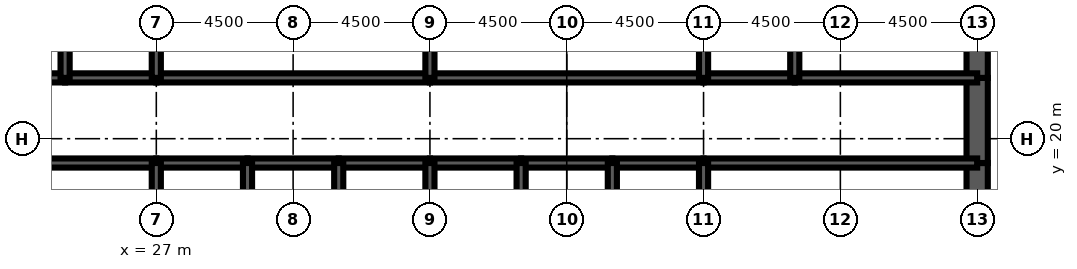
"""IFC4 building model, lengths in metres.
Left out: names, types, materials, properties, quantities, classifications, styles, units other than length and angle.
Written with IfcOpenShell. Run it as: python <this file> out.ifc"""

import sys

from ifc_helpers import new_model, si_unit, direction, frame, frame_2d, origin, place, context, subcontext, project, spatial, rectangle, extrude, element, fill, save


model = new_model("IFC4")
c1 = context("Model", 3, precision=1e-05, world=origin(), true_north=direction((0.0, 1.0)))
c2 = subcontext(c1, "Body", "Model", "MODEL_VIEW")
j1 = project(units=[si_unit("LENGTHUNIT", "METRE"), si_unit("PLANEANGLEUNIT", "RADIAN")], contexts=[c1])
p1 = place(None, origin())
s1 = spatial("IfcSite", under=j1, at=p1, CompositionType="ELEMENT")
p2 = place(p1, origin())
s2 = spatial("IfcBuilding", under=s1, at=p2, CompositionType="ELEMENT")
p3 = place(p2, frame((0.0, 0.0, 304.7)))
s3 = spatial("IfcBuildingStorey", under=s2, at=p3, CompositionType="ELEMENT", Elevation=304.7)
p4 = place(p3, frame((54.0, 16.0, 0.0), z_axis=(0.0, 0.0, 1.0), x_axis=(0.0, 1.0, 0.0)))
e1 = element("IfcWall", 1, at=p4, inside=s3, PredefinedType="SHEAR", context=c2, shape_type="SweptSolid", body=[
    extrude(rectangle(XDim=3.2, YDim=0.7, at=frame_2d((1.6, 0.0))), origin(), (0.0, 0.0, 1.0), 4.2),
])
p5 = place(p3, frame((54.0, 19.2, 0.0), z_axis=(0.0, 0.0, 1.0), x_axis=(0.0, 1.0, 0.0)))
e2 = element("IfcWall", 2, at=p5, inside=s3, PredefinedType="SHEAR", context=c2, shape_type="SweptSolid", body=[
    extrude(rectangle(XDim=2.8, YDim=0.7, at=frame_2d((1.4, 0.0))), origin(), (0.0, 0.0, 1.0), 4.2),
])
p6 = place(p5, frame((0.4, 0.0, 0.0)))
e3 = element("IfcOpeningElement", 3, at=p6, cuts=e2, PredefinedType="OPENING", context=c2, shape_type="SweptSolid", body=[
    extrude(rectangle(XDim=1.8, YDim=2.1, at=frame_2d((0.9, 1.05))), frame((0.0, 0.36, 0.0), z_axis=(0.0, -1.0, 0.0), x_axis=(1.0, 0.0, 0.0)), (0.0, 0.0, 1.0), 0.72),
])
p7 = place(p3, frame((54.0, 22.0, 0.0), z_axis=(0.0, 0.0, 1.0), x_axis=(0.0, 1.0, 0.0)))
e4 = element("IfcWall", 4, at=p7, inside=s3, PredefinedType="SHEAR", context=c2, shape_type="SweptSolid", body=[
    extrude(rectangle(XDim=4.0, YDim=0.7, at=frame_2d((2.0, 0.0))), origin(), (0.0, 0.0, 1.0), 4.2),
])
p8 = place(p3, frame((18.0, 19.2, 0.0), z_axis=(0.0, 0.0, 1.0), x_axis=(1.0, 0.0, 0.0)))
e5 = element("IfcWall", 5, at=p8, inside=s3, PredefinedType="SOLIDWALL", context=c2, shape_type="SweptSolid", body=[
    extrude(rectangle(XDim=9.0, YDim=0.3, at=frame_2d((4.5, 0.0))), origin(), (0.0, 0.0, 1.0), 4.2),
])
p9 = place(p8, frame((0.65, 0.0, 0.0)))
e6 = element("IfcOpeningElement", 6, at=p9, cuts=e5, PredefinedType="OPENING", context=c2, shape_type="SweptSolid", body=[
    extrude(rectangle(XDim=1.0, YDim=2.1, at=frame_2d((0.5, 1.05))), frame((0.0, 0.16, 0.0), z_axis=(0.0, -1.0, 0.0), x_axis=(1.0, 0.0, 0.0)), (0.0, 0.0, 1.0), 0.32),
])
p10 = place(p3, frame((27.0, 19.2, 0.0), z_axis=(0.0, 0.0, 1.0), x_axis=(1.0, 0.0, 0.0)))
e7 = element("IfcWall", 7, at=p10, inside=s3, PredefinedType="SOLIDWALL", context=c2, shape_type="SweptSolid", body=[
    extrude(rectangle(XDim=3.0, YDim=0.3, at=frame_2d((1.5, 0.0))), origin(), (0.0, 0.0, 1.0), 4.2),
])
p11 = place(p10, frame((0.95, 0.0, 0.0)))
e8 = element("IfcOpeningElement", 8, at=p11, cuts=e7, PredefinedType="OPENING", context=c2, shape_type="SweptSolid", body=[
    extrude(rectangle(XDim=1.1, YDim=2.2, at=frame_2d((0.55, 1.1))), frame((0.0, 0.16, 0.0), z_axis=(0.0, -1.0, 0.0), x_axis=(1.0, 0.0, 0.0)), (0.0, 0.0, 1.0), 0.32),
])
p12 = place(p3, frame((30.0, 19.2, 0.0), z_axis=(0.0, 0.0, 1.0), x_axis=(1.0, 0.0, 0.0)))
e9 = element("IfcWall", 9, at=p12, inside=s3, PredefinedType="SOLIDWALL", context=c2, shape_type="SweptSolid", body=[
    extrude(rectangle(XDim=3.0, YDim=0.3, at=frame_2d((1.5, 0.0))), origin(), (0.0, 0.0, 1.0), 4.2),
])
p13 = place(p12, frame((0.95, 0.0, 0.0)))
e10 = element("IfcOpeningElement", 10, at=p13, cuts=e9, PredefinedType="OPENING", context=c2, shape_type="SweptSolid", body=[
    extrude(rectangle(XDim=1.1, YDim=2.2, at=frame_2d((0.55, 1.1))), frame((0.0, 0.16, 0.0), z_axis=(0.0, -1.0, 0.0), x_axis=(1.0, 0.0, 0.0)), (0.0, 0.0, 1.0), 0.32),
])
p14 = place(p3, frame((33.0, 19.2, 0.0), z_axis=(0.0, 0.0, 1.0), x_axis=(1.0, 0.0, 0.0)))
e11 = element("IfcWall", 11, at=p14, inside=s3, PredefinedType="SOLIDWALL", context=c2, shape_type="SweptSolid", body=[
    extrude(rectangle(XDim=3.0, YDim=0.3, at=frame_2d((1.5, 0.0))), origin(), (0.0, 0.0, 1.0), 4.2),
])
p15 = place(p14, frame((0.95, 0.0, 0.0)))
e12 = element("IfcOpeningElement", 12, at=p15, cuts=e11, PredefinedType="OPENING", context=c2, shape_type="SweptSolid", body=[
    extrude(rectangle(XDim=1.1, YDim=2.2, at=frame_2d((0.55, 1.1))), frame((0.0, 0.16, 0.0), z_axis=(0.0, -1.0, 0.0), x_axis=(1.0, 0.0, 0.0)), (0.0, 0.0, 1.0), 0.32),
])
p16 = place(p3, frame((36.0, 19.2, 0.0), z_axis=(0.0, 0.0, 1.0), x_axis=(1.0, 0.0, 0.0)))
e13 = element("IfcWall", 13, at=p16, inside=s3, PredefinedType="SOLIDWALL", context=c2, shape_type="SweptSolid", body=[
    extrude(rectangle(XDim=3.0, YDim=0.3, at=frame_2d((1.5, 0.0))), origin(), (0.0, 0.0, 1.0), 4.2),
])
p17 = place(p16, frame((0.95, 0.0, 0.0)))
e14 = element("IfcOpeningElement", 14, at=p17, cuts=e13, PredefinedType="OPENING", context=c2, shape_type="SweptSolid", body=[
    extrude(rectangle(XDim=1.1, YDim=2.2, at=frame_2d((0.55, 1.1))), frame((0.0, 0.16, 0.0), z_axis=(0.0, -1.0, 0.0), x_axis=(1.0, 0.0, 0.0)), (0.0, 0.0, 1.0), 0.32),
])
p18 = place(p3, frame((39.0, 19.2, 0.0), z_axis=(0.0, 0.0, 1.0), x_axis=(1.0, 0.0, 0.0)))
e15 = element("IfcWall", 15, at=p18, inside=s3, PredefinedType="SOLIDWALL", context=c2, shape_type="SweptSolid", body=[
    extrude(rectangle(XDim=3.0, YDim=0.3, at=frame_2d((1.5, 0.0))), origin(), (0.0, 0.0, 1.0), 4.2),
])
p19 = place(p18, frame((1.0, 0.0, 0.0)))
e16 = element("IfcOpeningElement", 16, at=p19, cuts=e15, PredefinedType="OPENING", context=c2, shape_type="SweptSolid", body=[
    extrude(rectangle(XDim=1.0, YDim=2.1, at=frame_2d((0.5, 1.05))), frame((0.0, 0.16, 0.0), z_axis=(0.0, -1.0, 0.0), x_axis=(1.0, 0.0, 0.0)), (0.0, 0.0, 1.0), 0.32),
])
p20 = place(p3, frame((42.0, 19.2, 0.0), z_axis=(0.0, 0.0, 1.0), x_axis=(1.0, 0.0, 0.0)))
e17 = element("IfcWall", 17, at=p20, inside=s3, PredefinedType="SOLIDWALL", context=c2, shape_type="SweptSolid", body=[
    extrude(rectangle(XDim=3.0, YDim=0.3, at=frame_2d((1.5, 0.0))), origin(), (0.0, 0.0, 1.0), 4.2),
])
p21 = place(p20, frame((1.0, 0.0, 0.0)))
e18 = element("IfcOpeningElement", 18, at=p21, cuts=e17, PredefinedType="OPENING", context=c2, shape_type="SweptSolid", body=[
    extrude(rectangle(XDim=1.0, YDim=2.1, at=frame_2d((0.5, 1.05))), frame((0.0, 0.16, 0.0), z_axis=(0.0, -1.0, 0.0), x_axis=(1.0, 0.0, 0.0)), (0.0, 0.0, 1.0), 0.32),
])
p22 = place(p3, frame((45.0, 19.2, 0.0), z_axis=(0.0, 0.0, 1.0), x_axis=(1.0, 0.0, 0.0)))
e19 = element("IfcWall", 19, at=p22, inside=s3, PredefinedType="SOLIDWALL", context=c2, shape_type="SweptSolid", body=[
    extrude(rectangle(XDim=9.0, YDim=0.3, at=frame_2d((4.5, 0.0))), origin(), (0.0, 0.0, 1.0), 4.2),
])
p23 = place(p22, frame((7.35, 0.0, 0.0)))
e20 = element("IfcOpeningElement", 20, at=p23, cuts=e19, PredefinedType="OPENING", context=c2, shape_type="SweptSolid", body=[
    extrude(rectangle(XDim=1.0, YDim=2.1, at=frame_2d((0.5, 1.05))), frame((0.0, 0.16, 0.0), z_axis=(0.0, -1.0, 0.0), x_axis=(1.0, 0.0, 0.0)), (0.0, 0.0, 1.0), 0.32),
])
p24 = place(p3, frame((18.0, 22.0, 0.0), z_axis=(0.0, 0.0, 1.0), x_axis=(1.0, 0.0, 0.0)))
e21 = element("IfcWall", 21, at=p24, inside=s3, PredefinedType="SOLIDWALL", context=c2, shape_type="SweptSolid", body=[
    extrude(rectangle(XDim=6.0, YDim=0.3, at=frame_2d((3.0, 0.0))), origin(), (0.0, 0.0, 1.0), 4.2),
])
p25 = place(p24, frame((4.4, 0.0, 0.0)))
e22 = element("IfcOpeningElement", 22, at=p25, cuts=e21, PredefinedType="OPENING", context=c2, shape_type="SweptSolid", body=[
    extrude(rectangle(XDim=1.0, YDim=2.1, at=frame_2d((0.5, 1.05))), frame((0.0, 0.16, 0.0), z_axis=(0.0, -1.0, 0.0), x_axis=(1.0, 0.0, 0.0)), (0.0, 0.0, 1.0), 0.32),
])
p26 = place(p24, frame((0.9, 0.0, 0.0)))
e23 = element("IfcOpeningElement", 23, at=p26, cuts=e21, PredefinedType="OPENING", context=c2, shape_type="SweptSolid", body=[
    extrude(rectangle(XDim=1.0, YDim=2.1, at=frame_2d((0.5, 1.05))), frame((0.0, 0.16, 0.0), z_axis=(0.0, -1.0, 0.0), x_axis=(1.0, 0.0, 0.0)), (0.0, 0.0, 1.0), 0.32),
])
p27 = place(p3, frame((24.0, 22.0, 0.0), z_axis=(0.0, 0.0, 1.0), x_axis=(1.0, 0.0, 0.0)))
e24 = element("IfcWall", 24, at=p27, inside=s3, PredefinedType="SOLIDWALL", context=c2, shape_type="SweptSolid", body=[
    extrude(rectangle(XDim=3.0, YDim=0.3, at=frame_2d((1.5, 0.0))), origin(), (0.0, 0.0, 1.0), 4.2),
])
p28 = place(p27, frame((1.0, 0.0, 0.0)))
e25 = element("IfcOpeningElement", 25, at=p28, cuts=e24, PredefinedType="OPENING", context=c2, shape_type="SweptSolid", body=[
    extrude(rectangle(XDim=1.0, YDim=2.1, at=frame_2d((0.5, 1.05))), frame((0.0, 0.16, 0.0), z_axis=(0.0, -1.0, 0.0), x_axis=(1.0, 0.0, 0.0)), (0.0, 0.0, 1.0), 0.32),
])
p29 = place(p3, frame((27.0, 22.0, 0.0), z_axis=(0.0, 0.0, 1.0), x_axis=(1.0, 0.0, 0.0)))
e26 = element("IfcWall", 26, at=p29, inside=s3, PredefinedType="SOLIDWALL", context=c2, shape_type="SweptSolid", body=[
    extrude(rectangle(XDim=9.0, YDim=0.3, at=frame_2d((4.5, 0.0))), origin(), (0.0, 0.0, 1.0), 4.2),
])
p30 = place(p29, frame((4.0, 0.0, 0.0)))
e27 = element("IfcOpeningElement", 27, at=p30, cuts=e26, PredefinedType="OPENING", context=c2, shape_type="SweptSolid", body=[
    extrude(rectangle(XDim=1.0, YDim=2.1, at=frame_2d((0.5, 1.05))), frame((0.0, 0.16, 0.0), z_axis=(0.0, -1.0, 0.0), x_axis=(1.0, 0.0, 0.0)), (0.0, 0.0, 1.0), 0.32),
])
p31 = place(p3, frame((36.0, 22.0, 0.0), z_axis=(0.0, 0.0, 1.0), x_axis=(1.0, 0.0, 0.0)))
e28 = element("IfcWall", 28, at=p31, inside=s3, PredefinedType="SOLIDWALL", context=c2, shape_type="SweptSolid", body=[
    extrude(rectangle(XDim=9.0, YDim=0.3, at=frame_2d((4.5, 0.0))), origin(), (0.0, 0.0, 1.0), 4.2),
])
p32 = place(p31, frame((4.0, 0.0, 0.0)))
e29 = element("IfcOpeningElement", 29, at=p32, cuts=e28, PredefinedType="OPENING", context=c2, shape_type="SweptSolid", body=[
    extrude(rectangle(XDim=1.0, YDim=2.1, at=frame_2d((0.5, 1.05))), frame((0.0, 0.16, 0.0), z_axis=(0.0, -1.0, 0.0), x_axis=(1.0, 0.0, 0.0)), (0.0, 0.0, 1.0), 0.32),
])
p33 = place(p3, frame((45.0, 22.0, 0.0), z_axis=(0.0, 0.0, 1.0), x_axis=(1.0, 0.0, 0.0)))
e30 = element("IfcWall", 30, at=p33, inside=s3, PredefinedType="SOLIDWALL", context=c2, shape_type="SweptSolid", body=[
    extrude(rectangle(XDim=3.0, YDim=0.3, at=frame_2d((1.5, 0.0))), origin(), (0.0, 0.0, 1.0), 4.2),
])
p34 = place(p33, frame((1.0, 0.0, 0.0)))
e31 = element("IfcOpeningElement", 31, at=p34, cuts=e30, PredefinedType="OPENING", context=c2, shape_type="SweptSolid", body=[
    extrude(rectangle(XDim=1.0, YDim=2.1, at=frame_2d((0.5, 1.05))), frame((0.0, 0.16, 0.0), z_axis=(0.0, -1.0, 0.0), x_axis=(1.0, 0.0, 0.0)), (0.0, 0.0, 1.0), 0.32),
])
p35 = place(p3, frame((48.0, 22.0, 0.0), z_axis=(0.0, 0.0, 1.0), x_axis=(1.0, 0.0, 0.0)))
e32 = element("IfcWall", 32, at=p35, inside=s3, PredefinedType="SOLIDWALL", context=c2, shape_type="SweptSolid", body=[
    extrude(rectangle(XDim=6.0, YDim=0.3, at=frame_2d((3.0, 0.0))), origin(), (0.0, 0.0, 1.0), 4.2),
])
p36 = place(p35, frame((2.0, 0.0, 0.0)))
e33 = element("IfcOpeningElement", 33, at=p36, cuts=e32, PredefinedType="OPENING", context=c2, shape_type="SweptSolid", body=[
    extrude(rectangle(XDim=1.0, YDim=2.1, at=frame_2d((0.5, 1.05))), frame((0.0, 0.16, 0.0), z_axis=(0.0, -1.0, 0.0), x_axis=(1.0, 0.0, 0.0)), (0.0, 0.0, 1.0), 0.32),
])
p37 = place(p35, frame((4.4, 0.0, 0.0)))
e34 = element("IfcOpeningElement", 34, at=p37, cuts=e32, PredefinedType="OPENING", context=c2, shape_type="SweptSolid", body=[
    extrude(rectangle(XDim=1.0, YDim=2.1, at=frame_2d((0.5, 1.05))), frame((0.0, 0.16, 0.0), z_axis=(0.0, -1.0, 0.0), x_axis=(1.0, 0.0, 0.0)), (0.0, 0.0, 1.0), 0.32),
])
for number, where, z_axis, x_axis in (
    (35, (27.0, 16.0, 0.0), (0.0, 0.0, 1.0), (0.0, 1.0, 0.0)),
    (36, (30.0, 16.0, 0.0), (0.0, 0.0, 1.0), (0.0, 1.0, 0.0)),
    (37, (33.0, 16.0, 0.0), (0.0, 0.0, 1.0), (0.0, 1.0, 0.0)),
    (38, (36.0, 16.0, 0.0), (0.0, 0.0, 1.0), (0.0, 1.0, 0.0)),
    (39, (39.0, 16.0, 0.0), (0.0, 0.0, 1.0), (0.0, 1.0, 0.0)),
    (40, (42.0, 16.0, 0.0), (0.0, 0.0, 1.0), (0.0, 1.0, 0.0)),
    (41, (45.0, 16.0, 0.0), (0.0, 0.0, 1.0), (0.0, 1.0, 0.0)),
):
    element("IfcWall", number, at=place(p3, frame(where, z_axis=z_axis, x_axis=x_axis)), inside=s3, PredefinedType="SOLIDWALL", context=c2, shape_type="SweptSolid", body=[
        extrude(rectangle(XDim=3.2, YDim=0.3, at=frame_2d((1.6, 0.0))), origin(), (0.0, 0.0, 1.0), 4.2),
    ])
for number, where, z_axis, x_axis in (
    (42, (24.0, 22.0, 0.0), (0.0, 0.0, 1.0), (0.0, 1.0, 0.0)),
    (43, (27.0, 22.0, 0.0), (0.0, 0.0, 1.0), (0.0, 1.0, 0.0)),
    (44, (36.0, 22.0, 0.0), (0.0, 0.0, 1.0), (0.0, 1.0, 0.0)),
    (45, (45.0, 22.0, 0.0), (0.0, 0.0, 1.0), (0.0, 1.0, 0.0)),
    (46, (48.0, 22.0, 0.0), (0.0, 0.0, 1.0), (0.0, 1.0, 0.0)),
):
    element("IfcWall", number, at=place(p3, frame(where, z_axis=z_axis, x_axis=x_axis)), inside=s3, PredefinedType="SOLIDWALL", context=c2, shape_type="SweptSolid", body=[
        extrude(rectangle(XDim=4.0, YDim=0.3, at=frame_2d((2.0, 0.0))), origin(), (0.0, 0.0, 1.0), 4.2),
    ])
p38 = place(p3, frame((42.5, 22.15, 0.0), z_axis=(0.0, 0.0, 1.0), x_axis=(0.0, 1.0, 0.0)))
e47 = element("IfcWall", 47, at=p38, inside=s3, PredefinedType="PARTITIONING", context=c2, shape_type="SweptSolid", body=[
    extrude(rectangle(XDim=3.7, YDim=0.15, at=frame_2d((1.85, 0.0))), origin(), (0.0, 0.0, 1.0), 3.0),
])
p39 = place(p38, frame((2.2, 0.0, 0.0)))
e48 = element("IfcOpeningElement", 48, at=p39, cuts=e47, PredefinedType="OPENING", context=c2, shape_type="SweptSolid", body=[
    extrude(rectangle(XDim=1.0, YDim=2.1, at=frame_2d((0.5, 1.05))), frame((0.0, 0.085, 0.0), z_axis=(0.0, -1.0, 0.0), x_axis=(1.0, 0.0, 0.0)), (0.0, 0.0, 1.0), 0.17),
])
p40 = place(p3, frame((52.075, 22.15, 0.0), z_axis=(0.0, 0.0, 1.0), x_axis=(0.0, 1.0, 0.0)))
e49 = element("IfcWall", 49, at=p40, inside=s3, PredefinedType="PARTITIONING", context=c2, shape_type="SweptSolid", body=[
    extrude(rectangle(XDim=3.7, YDim=0.15, at=frame_2d((1.85, 0.0))), origin(), (0.0, 0.0, 1.0), 3.0),
])
p41 = place(p3, frame((24.5, 19.35, 0.0), z_axis=(0.0, 0.0, 1.0), x_axis=(0.0, 1.0, 0.0)))
e50 = element("IfcWall", 50, at=p41, inside=s3, PredefinedType="PARTITIONING", context=c2, shape_type="SweptSolid", body=[
    extrude(rectangle(XDim=2.5, YDim=0.15, at=frame_2d((1.25, 0.0))), origin(), (0.0, 0.0, 1.0), 3.0),
])
p42 = place(p41, frame((1.15, 0.0, 0.0)))
e51 = element("IfcOpeningElement", 51, at=p42, cuts=e50, PredefinedType="OPENING", context=c2, shape_type="SweptSolid", body=[
    extrude(rectangle(XDim=1.0, YDim=2.1, at=frame_2d((0.5, 1.05))), frame((0.0, 0.085, 0.0), z_axis=(0.0, -1.0, 0.0), x_axis=(1.0, 0.0, 0.0)), (0.0, 0.0, 1.0), 0.17),
])
p43 = place(p42, origin())
e52 = element("IfcDoor", 52, at=p43, inside=s3, OperationType="SINGLE_SWING_RIGHT", PredefinedType="DOOR", context=c2, shape_type="SweptSolid", body=[
    extrude(rectangle(XDim=1.0, YDim=2.1, at=frame_2d((0.5, 1.05))), frame((0.0, 0.025, 0.0), z_axis=(0.0, -1.0, 0.0), x_axis=(1.0, 0.0, 0.0)), (0.0, 0.0, 1.0), 0.05),
])
fill(e51, e52)
p44 = place(p11, origin())
e53 = element("IfcDoor", 53, at=p44, inside=s3, OperationType="DOUBLE_DOOR_SLIDING", PredefinedType="USERDEFINED", context=c2, shape_type="SweptSolid", body=[
    extrude(rectangle(XDim=1.1, YDim=2.2, at=frame_2d((0.55, 1.1))), frame((0.0, 0.025, 0.0), z_axis=(0.0, -1.0, 0.0), x_axis=(1.0, 0.0, 0.0)), (0.0, 0.0, 1.0), 0.05),
])
fill(e8, e53)
p45 = place(p13, origin())
e54 = element("IfcDoor", 54, at=p45, inside=s3, OperationType="DOUBLE_DOOR_SLIDING", PredefinedType="USERDEFINED", context=c2, shape_type="SweptSolid", body=[
    extrude(rectangle(XDim=1.1, YDim=2.2, at=frame_2d((0.55, 1.1))), frame((0.0, 0.025, 0.0), z_axis=(0.0, -1.0, 0.0), x_axis=(1.0, 0.0, 0.0)), (0.0, 0.0, 1.0), 0.05),
])
fill(e10, e54)
p46 = place(p15, origin())
e55 = element("IfcDoor", 55, at=p46, inside=s3, OperationType="DOUBLE_DOOR_SLIDING", PredefinedType="USERDEFINED", context=c2, shape_type="SweptSolid", body=[
    extrude(rectangle(XDim=1.1, YDim=2.2, at=frame_2d((0.55, 1.1))), frame((0.0, 0.025, 0.0), z_axis=(0.0, -1.0, 0.0), x_axis=(1.0, 0.0, 0.0)), (0.0, 0.0, 1.0), 0.05),
])
fill(e12, e55)
p47 = place(p17, origin())
e56 = element("IfcDoor", 56, at=p47, inside=s3, OperationType="DOUBLE_DOOR_SLIDING", PredefinedType="USERDEFINED", context=c2, shape_type="SweptSolid", body=[
    extrude(rectangle(XDim=1.1, YDim=2.2, at=frame_2d((0.55, 1.1))), frame((0.0, 0.025, 0.0), z_axis=(0.0, -1.0, 0.0), x_axis=(1.0, 0.0, 0.0)), (0.0, 0.0, 1.0), 0.05),
])
fill(e14, e56)
p48 = place(p23, origin())
e57 = element("IfcDoor", 57, at=p48, inside=s3, OperationType="SINGLE_SWING_RIGHT", PredefinedType="DOOR", context=c2, shape_type="SweptSolid", body=[
    extrude(rectangle(XDim=1.0, YDim=2.1, at=frame_2d((0.5, 1.05))), frame((0.0, 0.025, 0.0), z_axis=(0.0, -1.0, 0.0), x_axis=(1.0, 0.0, 0.0)), (0.0, 0.0, 1.0), 0.05),
])
fill(e20, e57)
p49 = place(p6, origin())
e58 = element("IfcDoor", 58, at=p49, inside=s3, OperationType="SINGLE_SWING_LEFT", PredefinedType="DOOR", context=c2, shape_type="SweptSolid", body=[
    extrude(rectangle(XDim=1.8, YDim=2.1, at=frame_2d((0.9, 1.05))), frame((0.0, 0.35, 0.0), z_axis=(0.0, -1.0, 0.0), x_axis=(1.0, 0.0, 0.0)), (0.0, 0.0, 1.0), 0.699),
])
fill(e3, e58)
p50 = place(p28, origin())
e59 = element("IfcDoor", 59, at=p50, inside=s3, OperationType="SINGLE_SWING_LEFT", PredefinedType="DOOR", context=c2, shape_type="SweptSolid", body=[
    extrude(rectangle(XDim=1.0, YDim=2.1, at=frame_2d((0.5, 1.05))), frame((0.0, 0.025, 0.0), z_axis=(0.0, -1.0, 0.0), x_axis=(1.0, 0.0, 0.0)), (0.0, 0.0, 1.0), 0.05),
])
fill(e25, e59)
p51 = place(p30, origin())
e60 = element("IfcDoor", 60, at=p51, inside=s3, OperationType="SINGLE_SWING_LEFT", PredefinedType="DOOR", context=c2, shape_type="SweptSolid", body=[
    extrude(rectangle(XDim=1.0, YDim=2.1, at=frame_2d((0.5, 1.05))), frame((0.0, 0.025, 0.0), z_axis=(0.0, -1.0, 0.0), x_axis=(1.0, 0.0, 0.0)), (0.0, 0.0, 1.0), 0.05),
])
fill(e27, e60)
p52 = place(p32, origin())
e61 = element("IfcDoor", 61, at=p52, inside=s3, OperationType="SINGLE_SWING_LEFT", PredefinedType="DOOR", context=c2, shape_type="SweptSolid", body=[
    extrude(rectangle(XDim=1.0, YDim=2.1, at=frame_2d((0.5, 1.05))), frame((0.0, 0.025, 0.0), z_axis=(0.0, -1.0, 0.0), x_axis=(1.0, 0.0, 0.0)), (0.0, 0.0, 1.0), 0.05),
])
fill(e29, e61)
p53 = place(p34, origin())
e62 = element("IfcDoor", 62, at=p53, inside=s3, OperationType="SINGLE_SWING_LEFT", PredefinedType="DOOR", context=c2, shape_type="SweptSolid", body=[
    extrude(rectangle(XDim=1.0, YDim=2.1, at=frame_2d((0.5, 1.05))), frame((0.0, 0.025, 0.0), z_axis=(0.0, -1.0, 0.0), x_axis=(1.0, 0.0, 0.0)), (0.0, 0.0, 1.0), 0.05),
])
fill(e31, e62)
p54 = place(p36, origin())
e63 = element("IfcDoor", 63, at=p54, inside=s3, OperationType="SINGLE_SWING_LEFT", PredefinedType="DOOR", context=c2, shape_type="SweptSolid", body=[
    extrude(rectangle(XDim=1.0, YDim=2.1, at=frame_2d((0.5, 1.05))), frame((0.0, 0.025, 0.0), z_axis=(0.0, -1.0, 0.0), x_axis=(1.0, 0.0, 0.0)), (0.0, 0.0, 1.0), 0.05),
])
fill(e33, e63)
p55 = place(p37, origin())
e64 = element("IfcDoor", 64, at=p55, inside=s3, OperationType="SINGLE_SWING_RIGHT", PredefinedType="DOOR", context=c2, shape_type="SweptSolid", body=[
    extrude(rectangle(XDim=1.0, YDim=2.1, at=frame_2d((0.5, 1.05))), frame((0.0, 0.025, 0.0), z_axis=(0.0, -1.0, 0.0), x_axis=(1.0, 0.0, 0.0)), (0.0, 0.0, 1.0), 0.05),
])
fill(e34, e64)
p56 = place(p19, origin())
e65 = element("IfcDoor", 65, at=p56, inside=s3, OperationType="SINGLE_SWING_LEFT", PredefinedType="DOOR", context=c2, shape_type="SweptSolid", body=[
    extrude(rectangle(XDim=1.0, YDim=2.1, at=frame_2d((0.5, 1.05))), frame((0.0, 0.025, 0.0), z_axis=(0.0, -1.0, 0.0), x_axis=(1.0, 0.0, 0.0)), (0.0, 0.0, 1.0), 0.05),
])
fill(e16, e65)
p57 = place(p21, origin())
e66 = element("IfcDoor", 66, at=p57, inside=s3, OperationType="SINGLE_SWING_LEFT", PredefinedType="DOOR", context=c2, shape_type="SweptSolid", body=[
    extrude(rectangle(XDim=1.0, YDim=2.1, at=frame_2d((0.5, 1.05))), frame((0.0, 0.025, 0.0), z_axis=(0.0, -1.0, 0.0), x_axis=(1.0, 0.0, 0.0)), (0.0, 0.0, 1.0), 0.05),
])
fill(e18, e66)
save(model, sys.argv[1])
